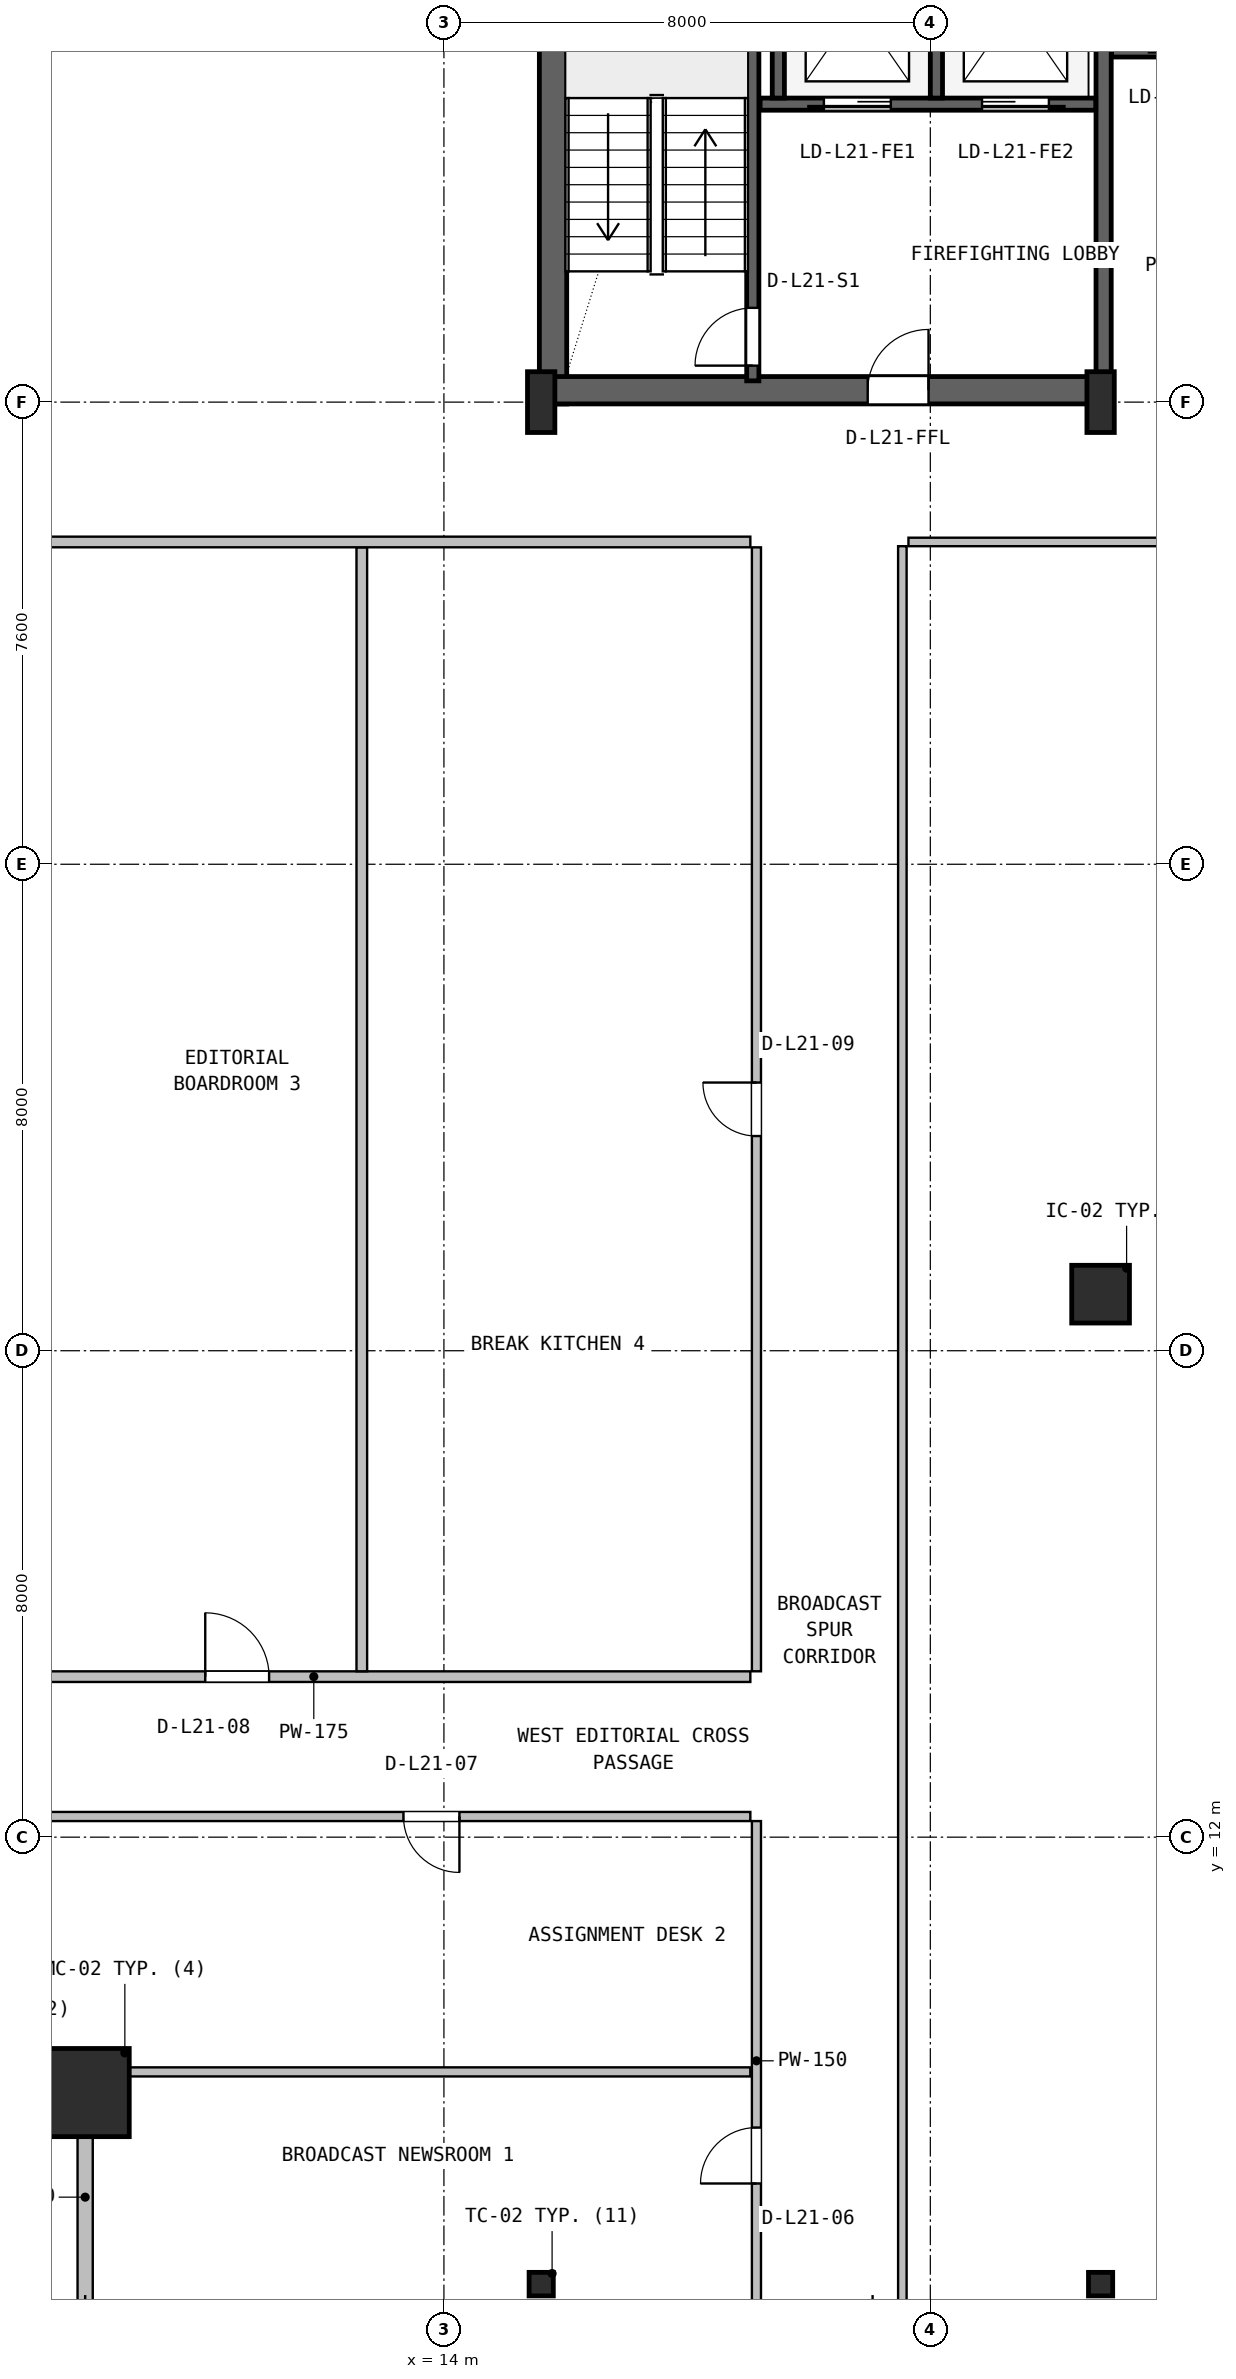
"""IFC4 building model, lengths in metres.
Left out: names, types, materials, properties, quantities, classifications, styles, units other than length and angle.
Written with IfcOpenShell. Run it as: python <this file> out.ifc"""

import sys

from ifc_helpers import new_model, si_unit, direction, frame, frame_2d, origin, origin_2d, place, context, subcontext, project, spatial, rectangle, hollow_rectangle, i_section, extrude, source, transform, mapped, element, fill, save


model = new_model("IFC4")
c1 = context("Model", 3, precision=1e-05, world=origin(), true_north=direction((0.0, 1.0)))
c2 = subcontext(c1, "Body", "Model", "MODEL_VIEW")
j1 = project(units=[si_unit("LENGTHUNIT", "METRE"), si_unit("PLANEANGLEUNIT", "RADIAN")], contexts=[c1])
p1 = place(None, origin())
s1 = spatial("IfcSite", under=j1, at=p1, CompositionType="ELEMENT")
p2 = place(p1, origin())
s2 = spatial("IfcBuilding", under=s1, at=p2, CompositionType="ELEMENT")
p3 = place(p2, frame((0.0, 0.0, 90.8)))
s3 = spatial("IfcBuildingStorey", under=s2, at=p3, CompositionType="ELEMENT", Elevation=90.8)
p4 = place(p3, frame((15.795, 35.57, 0.0), z_axis=(0.0, 0.0, 1.0), x_axis=(0.0, 1.0, 0.0)))
e1 = element("IfcWall", 1, at=p4, inside=s3, PredefinedType="SHEAR", context=c2, shape_type="SweptSolid", body=[
    extrude(rectangle(XDim=11.23, YDim=0.45, at=frame_2d((5.615, 0.0))), origin(), (0.0, 0.0, 1.0), 3.55),
])
p5 = place(p3, frame((15.57, 35.795, 0.0), z_axis=(0.0, 0.0, 1.0), x_axis=(1.0, 0.0, 0.0)))
e2 = element("IfcWall", 2, at=p5, inside=s3, PredefinedType="SHEAR", context=c2, shape_type="SweptSolid", body=[
    extrude(rectangle(XDim=9.23, YDim=0.45, at=frame_2d((4.615, 0.0))), origin(), (0.0, 0.0, 1.0), 3.55),
])
p6 = place(p5, frame((5.4, 0.0, 0.0)))
e3 = element("IfcOpeningElement", 3, at=p6, cuts=e2, PredefinedType="OPENING", context=c2, shape_type="SweptSolid", body=[
    extrude(rectangle(XDim=1.0, YDim=2.1, at=frame_2d((0.5, 1.05))), frame((0.0, 0.235, 0.0), z_axis=(0.0, -1.0, 0.0), x_axis=(1.0, 0.0, 0.0)), (0.0, 0.0, 1.0), 0.47),
])
m1 = source(origin(), c2, "Body", "SweptSolid", [
    extrude(i_section(OverallWidth=0.45, OverallDepth=1.0, WebThickness=0.016, FlangeThickness=0.03, FilletRadius=0.016, at=origin_2d()), origin(), (0.0, 0.0, 1.0), 3.8),
])
for number, where, z_axis, x_axis in (
    (4, (15.6, 35.6, 0.0), (0.0, 0.0, 1.0), (1.0, 0.0, 0.0)),
    (5, (24.8, 35.6, 0.0), (0.0, 0.0, 1.0), (1.0, 0.0, 0.0)),
):
    element("IfcColumn", number, at=place(p3, frame(where, z_axis=z_axis, x_axis=x_axis)), inside=s3, PredefinedType="COLUMN", context=c2, shape_type="MappedRepresentation", body=[
        mapped(m1, transform((0.0, 0.0, 0.0), x_axis=(1.0, 0.0, 0.0), y_axis=(0.0, 1.0, 0.0), z_axis=(0.0, 0.0, 1.0), scale=1.0)),
    ])
m2 = source(origin(), c2, "Body", "SweptSolid", [
    extrude(hollow_rectangle(XDim=1.45, YDim=1.45, WallThickness=0.055, at=origin_2d()), origin(), (0.0, 0.0, 1.0), 3.8),
])
p7 = place(p3, frame((8.1, 7.8, 0.0), z_axis=(0.0, 0.0, 1.0), x_axis=(1.0, 0.0, 0.0)))
e6 = element("IfcColumn", 6, at=p7, inside=s3, PredefinedType="COLUMN", context=c2, shape_type="MappedRepresentation", body=[
    mapped(m2, transform((0.0, 0.0, 0.0), x_axis=(1.0, 0.0, 0.0), y_axis=(0.0, 1.0, 0.0), z_axis=(0.0, 0.0, 1.0), scale=1.0)),
])
m3 = source(origin(), c2, "Body", "SweptSolid", [
    extrude(i_section(OverallWidth=0.398, OverallDepth=0.387, WebThickness=0.021, FlangeThickness=0.033, FilletRadius=0.018, at=origin_2d()), origin(), (0.0, 0.0, 1.0), 3.8),
])
for number, where, z_axis, x_axis in (
    (7, (15.6, 4.65, 0.0), (0.0, 0.0, 1.0), (1.0, 0.0, 0.0)),
    (8, (24.8, 4.65, 0.0), (0.0, 0.0, 1.0), (1.0, 0.0, 0.0)),
):
    element("IfcColumn", number, at=place(p3, frame(where, z_axis=z_axis, x_axis=x_axis)), inside=s3, PredefinedType="COLUMN", context=c2, shape_type="MappedRepresentation", body=[
        mapped(m3, transform((0.0, 0.0, 0.0), x_axis=(1.0, 0.0, 0.0), y_axis=(0.0, 1.0, 0.0), z_axis=(0.0, 0.0, 1.0), scale=1.0)),
    ])
m4 = source(origin(), c2, "Body", "SweptSolid", [
    extrude(rectangle(XDim=0.95, YDim=0.95, at=origin_2d()), origin(), (0.0, 0.0, 1.0), 3.8),
])
p8 = place(p3, frame((24.8, 20.93, 0.0), z_axis=(0.0, 0.0, 1.0), x_axis=(1.0, 0.0, 0.0)))
e9 = element("IfcColumn", 9, at=p8, inside=s3, PredefinedType="COLUMN", context=c2, shape_type="MappedRepresentation", body=[
    mapped(m4, transform((0.0, 0.0, 0.0), x_axis=(1.0, 0.0, 0.0), y_axis=(0.0, 1.0, 0.0), z_axis=(0.0, 0.0, 1.0), scale=1.0)),
])
p9 = place(p3, frame((8.1, 4.28, 0.0), z_axis=(0.0, 0.0, 1.0), x_axis=(0.0, 1.0, 0.0)))
e10 = element("IfcWall", 10, at=p9, inside=s3, PredefinedType="SOLIDWALL", context=c2, shape_type="SweptSolid", body=[
    extrude(rectangle(XDim=3.6, YDim=0.25, at=frame_2d((1.8, 0.0))), origin(), (0.0, 0.0, 1.0), 3.108),
])
p10 = place(p3, frame((19.08, 35.95, 0.0), z_axis=(0.0, 0.0, 1.0), x_axis=(0.0, 1.0, 0.0)))
e11 = element("IfcWall", 11, at=p10, inside=s3, PredefinedType="SHEAR", context=c2, shape_type="SweptSolid", body=[
    extrude(rectangle(XDim=9.65, YDim=0.2, at=frame_2d((4.825, 0.0))), origin(), (0.0, 0.0, 1.0), 3.55),
])
p11 = place(p10, frame((0.25, 0.0, 0.0)))
e12 = element("IfcOpeningElement", 12, at=p11, cuts=e11, PredefinedType="OPENING", context=c2, shape_type="SweptSolid", body=[
    extrude(rectangle(XDim=0.95, YDim=2.1, at=frame_2d((0.475, 1.05))), frame((0.0, 0.11, 0.0), z_axis=(0.0, -1.0, 0.0), x_axis=(1.0, 0.0, 0.0)), (0.0, 0.0, 1.0), 0.22),
])
p12 = place(p3, frame((24.85, 36.05, 0.0), z_axis=(0.0, 0.0, 1.0), x_axis=(0.0, 1.0, 0.0)))
e13 = element("IfcWall", 13, at=p12, inside=s3, PredefinedType="SHEAR", context=c2, shape_type="SweptSolid", body=[
    extrude(rectangle(XDim=10.45, YDim=0.25, at=frame_2d((5.225, 0.0))), origin(), (0.0, 0.0, 1.0), 3.55),
])
p13 = place(p3, frame((19.2, 40.5, 0.0), z_axis=(0.0, 0.0, 1.0), x_axis=(1.0, 0.0, 0.0)))
e14 = element("IfcWall", 14, at=p13, inside=s3, PredefinedType="SHEAR", context=c2, shape_type="SweptSolid", body=[
    extrude(rectangle(XDim=5.52, YDim=0.2, at=frame_2d((2.76, 0.0))), origin(), (0.0, 0.0, 1.0), 3.55),
])
p14 = place(p13, frame((1.05, 0.0, 0.0)))
e15 = element("IfcOpeningElement", 15, at=p14, cuts=e14, PredefinedType="OPENING", context=c2, shape_type="SweptSolid", body=[
    extrude(rectangle(XDim=1.1, YDim=2.18, at=frame_2d((0.55, 1.09))), frame((0.0, 0.11, 0.0), z_axis=(0.0, -1.0, 0.0), x_axis=(1.0, 0.0, 0.0)), (0.0, 0.0, 1.0), 0.22),
])
p15 = place(p13, frame((3.65, 0.0, 0.0)))
e16 = element("IfcOpeningElement", 16, at=p15, cuts=e14, PredefinedType="OPENING", context=c2, shape_type="SweptSolid", body=[
    extrude(rectangle(XDim=1.1, YDim=2.18, at=frame_2d((0.55, 1.09))), frame((0.0, 0.11, 0.0), z_axis=(0.0, -1.0, 0.0), x_axis=(1.0, 0.0, 0.0)), (0.0, 0.0, 1.0), 0.22),
])
p16 = place(p3, frame((22.1, 40.6, 0.0), z_axis=(0.0, 0.0, 1.0), x_axis=(0.0, 1.0, 0.0)))
e17 = element("IfcWall", 17, at=p16, inside=s3, PredefinedType="SHEAR", context=c2, shape_type="SweptSolid", body=[
    extrude(rectangle(XDim=3.0, YDim=0.2, at=frame_2d((1.5, 0.0))), origin(), (0.0, 0.0, 1.0), 3.55),
])
p17 = place(p3, frame((19.5, 40.6, 0.0), z_axis=(0.0, 0.0, 1.0), x_axis=(0.0, 1.0, 0.0)))
e18 = element("IfcWall", 18, at=p17, inside=s3, PredefinedType="SHEAR", context=c2, shape_type="SweptSolid", body=[
    extrude(rectangle(XDim=5.95, YDim=0.2, at=frame_2d((2.975, 0.0))), origin(), (0.0, 0.0, 1.0), 3.55),
])
p18 = place(p3, frame((24.98, 41.4, 0.0), z_axis=(0.0, 0.0, 1.0), x_axis=(1.0, 0.0, 0.0)))
e19 = element("IfcWall", 19, at=p18, inside=s3, PredefinedType="SHEAR", context=c2, shape_type="SweptSolid", body=[
    extrude(rectangle(XDim=23.82, YDim=0.25, at=frame_2d((11.91, 0.0))), origin(), (0.0, 0.0, 1.0), 3.55),
])
p19 = place(p18, frame((0.87, 0.0, 0.0)))
e20 = element("IfcOpeningElement", 20, at=p19, cuts=e19, PredefinedType="OPENING", context=c2, shape_type="SweptSolid", body=[
    extrude(rectangle(XDim=1.1, YDim=2.18, at=frame_2d((0.55, 1.09))), frame((0.0, 0.135, 0.0), z_axis=(0.0, -1.0, 0.0), x_axis=(1.0, 0.0, 0.0)), (0.0, 0.0, 1.0), 0.27),
])
p20 = place(p18, frame((3.47, 0.0, 0.0)))
e21 = element("IfcOpeningElement", 21, at=p20, cuts=e19, PredefinedType="OPENING", context=c2, shape_type="SweptSolid", body=[
    extrude(rectangle(XDim=1.1, YDim=2.18, at=frame_2d((0.55, 1.09))), frame((0.0, 0.135, 0.0), z_axis=(0.0, -1.0, 0.0), x_axis=(1.0, 0.0, 0.0)), (0.0, 0.0, 1.0), 0.27),
])
p21 = place(p18, frame((6.07, 0.0, 0.0)))
e22 = element("IfcOpeningElement", 22, at=p21, cuts=e19, PredefinedType="OPENING", context=c2, shape_type="SweptSolid", body=[
    extrude(rectangle(XDim=1.1, YDim=2.18, at=frame_2d((0.55, 1.09))), frame((0.0, 0.135, 0.0), z_axis=(0.0, -1.0, 0.0), x_axis=(1.0, 0.0, 0.0)), (0.0, 0.0, 1.0), 0.27),
])
p22 = place(p3, frame((19.14, 4.38, 0.0), z_axis=(0.0, 0.0, 1.0), x_axis=(0.0, 1.0, 0.0)))
e23 = element("IfcWall", 23, at=p22, inside=s3, PredefinedType="PARTITIONING", context=c2, shape_type="SweptSolid", body=[
    extrude(rectangle(XDim=7.885, YDim=0.15, at=frame_2d((3.942, 0.0))), origin(), (0.0, 0.0, 1.0), 3.108),
])
p23 = place(p22, frame((1.925, 0.0, 0.0)))
e24 = element("IfcOpeningElement", 24, at=p23, cuts=e23, PredefinedType="OPENING", context=c2, shape_type="SweptSolid", body=[
    extrude(rectangle(XDim=0.92, YDim=2.08, at=frame_2d((0.46, 1.04))), frame((0.0, 0.085, 0.0), z_axis=(0.0, -1.0, 0.0), x_axis=(1.0, 0.0, 0.0)), (0.0, 0.0, 1.0), 0.17),
])
p24 = place(p3, frame((4.68, 8.14, 0.0), z_axis=(0.0, 0.0, 1.0), x_axis=(1.0, 0.0, 0.0)))
e25 = element("IfcWall", 25, at=p24, inside=s3, PredefinedType="PARTITIONING", context=c2, shape_type="SweptSolid", body=[
    extrude(rectangle(XDim=14.36, YDim=0.15, at=frame_2d((7.18, 0.0))), origin(), (0.0, 0.0, 1.0), 3.108),
])
p25 = place(p3, frame((4.68, 12.34, 0.0), z_axis=(0.0, 0.0, 1.0), x_axis=(1.0, 0.0, 0.0)))
e26 = element("IfcWall", 26, at=p25, inside=s3, PredefinedType="PARTITIONING", context=c2, shape_type="SweptSolid", body=[
    extrude(rectangle(XDim=14.36, YDim=0.15, at=frame_2d((7.18, 0.0))), origin(), (0.0, 0.0, 1.0), 3.108),
])
p26 = place(p25, frame((8.655, 0.0, 0.0)))
e27 = element("IfcOpeningElement", 27, at=p26, cuts=e26, PredefinedType="OPENING", context=c2, shape_type="SweptSolid", body=[
    extrude(rectangle(XDim=0.92, YDim=2.08, at=frame_2d((0.46, 1.04))), frame((0.0, 0.085, 0.0), z_axis=(0.0, -1.0, 0.0), x_axis=(1.0, 0.0, 0.0)), (0.0, 0.0, 1.0), 0.17),
])
p27 = place(p3, frame((4.68, 14.64, 0.0), z_axis=(0.0, 0.0, 1.0), x_axis=(1.0, 0.0, 0.0)))
e28 = element("IfcWall", 28, at=p27, inside=s3, PredefinedType="PARTITIONING", context=c2, shape_type="SweptSolid", body=[
    extrude(rectangle(XDim=14.36, YDim=0.175, at=frame_2d((7.18, 0.0))), origin(), (0.0, 0.0, 1.0), 3.108),
])
p28 = place(p27, frame((5.395, 0.0, 0.0)))
e29 = element("IfcOpeningElement", 29, at=p28, cuts=e28, PredefinedType="OPENING", context=c2, shape_type="SweptSolid", body=[
    extrude(rectangle(XDim=1.05, YDim=2.1, at=frame_2d((0.525, 1.05))), frame((0.0, 0.098, 0.0), z_axis=(0.0, -1.0, 0.0), x_axis=(1.0, 0.0, 0.0)), (0.0, 0.0, 1.0), 0.195),
])
p29 = place(p3, frame((12.65, 14.728, 0.0), z_axis=(0.0, 0.0, 1.0), x_axis=(0.0, 1.0, 0.0)))
e30 = element("IfcWall", 30, at=p29, inside=s3, PredefinedType="PARTITIONING", context=c2, shape_type="SweptSolid", body=[
    extrude(rectangle(XDim=18.484, YDim=0.175, at=frame_2d((9.242, 0.0))), origin(), (0.0, 0.0, 1.0), 3.222),
])
p30 = place(p3, frame((4.68, 33.3, 0.0), z_axis=(0.0, 0.0, 1.0), x_axis=(1.0, 0.0, 0.0)))
e31 = element("IfcWall", 31, at=p30, inside=s3, PredefinedType="PARTITIONING", context=c2, shape_type="SweptSolid", body=[
    extrude(rectangle(XDim=14.36, YDim=0.175, at=frame_2d((7.18, 0.0))), origin(), (0.0, 0.0, 1.0), 3.108),
])
p31 = place(p3, frame((19.14, 14.728, 0.0), z_axis=(0.0, 0.0, 1.0), x_axis=(0.0, 1.0, 0.0)))
e32 = element("IfcWall", 32, at=p31, inside=s3, PredefinedType="PARTITIONING", context=c2, shape_type="SweptSolid", body=[
    extrude(rectangle(XDim=18.484, YDim=0.15, at=frame_2d((9.242, 0.0))), origin(), (0.0, 0.0, 1.0), 3.222),
])
p32 = place(p31, frame((8.802, 0.0, 0.0)))
e33 = element("IfcOpeningElement", 33, at=p32, cuts=e32, PredefinedType="OPENING", context=c2, shape_type="SweptSolid", body=[
    extrude(rectangle(XDim=0.88, YDim=2.06, at=frame_2d((0.44, 1.03))), frame((0.0, 0.085, 0.0), z_axis=(0.0, -1.0, 0.0), x_axis=(1.0, 0.0, 0.0)), (0.0, 0.0, 1.0), 0.17),
])
p33 = place(p3, frame((21.64, 33.3, 0.0), z_axis=(0.0, 0.0, 1.0), x_axis=(1.0, 0.0, 0.0)))
e34 = element("IfcWall", 34, at=p33, inside=s3, PredefinedType="PARTITIONING", context=c2, shape_type="SweptSolid", body=[
    extrude(rectangle(XDim=41.68, YDim=0.14, at=frame_2d((20.84, 0.0))), origin(), (0.0, 0.0, 1.0), 2.83),
])
p34 = place(p33, frame((18.405, 0.0, 0.0)))
e35 = element("IfcOpeningElement", 35, at=p34, cuts=e34, PredefinedType="OPENING", context=c2, shape_type="SweptSolid", body=[
    extrude(rectangle(XDim=1.0, YDim=2.1, at=frame_2d((0.5, 1.05))), frame((0.0, 0.08, 0.0), z_axis=(0.0, -1.0, 0.0), x_axis=(1.0, 0.0, 0.0)), (0.0, 0.0, 1.0), 0.16),
])
p35 = place(p3, frame((21.54, 4.38, 0.0), z_axis=(0.0, 0.0, 1.0), x_axis=(0.0, 1.0, 0.0)))
e36 = element("IfcWall", 36, at=p35, inside=s3, PredefinedType="PARTITIONING", context=c2, shape_type="SweptSolid", body=[
    extrude(rectangle(XDim=28.85, YDim=0.14, at=frame_2d((14.425, 0.0))), origin(), (0.0, 0.0, 1.0), 3.108),
])
m5 = source(origin(), c2, "Body", "SweptSolid", [
    extrude(rectangle(XDim=0.95, YDim=2.1, at=frame_2d((0.475, 1.05))), frame((0.0, 0.025, 0.0), z_axis=(0.0, -1.0, 0.0), x_axis=(1.0, 0.0, 0.0)), (0.0, 0.0, 1.0), 0.05),
])
p36 = place(p11, origin())
e37 = element("IfcDoor", 37, at=p36, inside=s3, OperationType="SINGLE_SWING_LEFT", PredefinedType="DOOR", context=c2, shape_type="MappedRepresentation", body=[
    mapped(m5, transform((0.0, 0.0, 0.0), x_axis=(1.0, 0.0, 0.0), y_axis=(0.0, 1.0, 0.0), z_axis=(0.0, 0.0, 1.0), scale=1.0)),
])
fill(e12, e37)
m6 = source(origin(), c2, "Body", "SweptSolid", [
    extrude(rectangle(XDim=1.0, YDim=2.1, at=frame_2d((0.5, 1.05))), frame((0.0, 0.025, 0.0), z_axis=(0.0, -1.0, 0.0), x_axis=(1.0, 0.0, 0.0)), (0.0, 0.0, 1.0), 0.05),
])
p37 = place(p6, origin())
e38 = element("IfcDoor", 38, at=p37, inside=s3, OperationType="SINGLE_SWING_RIGHT", PredefinedType="DOOR", context=c2, shape_type="MappedRepresentation", body=[
    mapped(m6, transform((0.0, 0.0, 0.0), x_axis=(1.0, 0.0, 0.0), y_axis=(0.0, 1.0, 0.0), z_axis=(0.0, 0.0, 1.0), scale=1.0)),
])
fill(e3, e38)
m7 = source(origin(), c2, "Body", "SweptSolid", [
    extrude(rectangle(XDim=1.1, YDim=2.18, at=frame_2d((0.55, 1.09))), frame((0.0, 0.025, 0.0), z_axis=(0.0, -1.0, 0.0), x_axis=(1.0, 0.0, 0.0)), (0.0, 0.0, 1.0), 0.05),
])
p38 = place(p14, frame((1.1, 0.0, 0.0), z_axis=(0.0, 0.0, 1.0), x_axis=(-1.0, 0.0, 0.0)))
e39 = element("IfcDoor", 39, at=p38, inside=s3, OperationType="SLIDING_TO_LEFT", PredefinedType="DOOR", context=c2, shape_type="MappedRepresentation", body=[
    mapped(m7, transform((0.0, 0.0, 0.0), x_axis=(1.0, 0.0, 0.0), y_axis=(0.0, 1.0, 0.0), z_axis=(0.0, 0.0, 1.0), scale=1.0)),
])
fill(e15, e39)
p39 = place(p15, frame((1.1, 0.0, 0.0), z_axis=(0.0, 0.0, 1.0), x_axis=(-1.0, 0.0, 0.0)))
e40 = element("IfcDoor", 40, at=p39, inside=s3, OperationType="SLIDING_TO_RIGHT", PredefinedType="DOOR", context=c2, shape_type="MappedRepresentation", body=[
    mapped(m7, transform((0.0, 0.0, 0.0), x_axis=(1.0, 0.0, 0.0), y_axis=(0.0, 1.0, 0.0), z_axis=(0.0, 0.0, 1.0), scale=1.0)),
])
fill(e16, e40)
m8 = source(origin(), c2, "Body", "SweptSolid", [
    extrude(rectangle(XDim=0.92, YDim=2.08, at=frame_2d((0.46, 1.04))), frame((0.0, 0.025, 0.0), z_axis=(0.0, -1.0, 0.0), x_axis=(1.0, 0.0, 0.0)), (0.0, 0.0, 1.0), 0.05),
])
p40 = place(p23, origin())
e41 = element("IfcDoor", 41, at=p40, inside=s3, OperationType="SINGLE_SWING_LEFT", PredefinedType="DOOR", context=c2, shape_type="MappedRepresentation", body=[
    mapped(m8, transform((0.0, 0.0, 0.0), x_axis=(1.0, 0.0, 0.0), y_axis=(0.0, 1.0, 0.0), z_axis=(0.0, 0.0, 1.0), scale=1.0)),
])
fill(e24, e41)
p41 = place(p26, frame((0.92, 0.0, 0.0), z_axis=(0.0, 0.0, 1.0), x_axis=(-1.0, 0.0, 0.0)))
e42 = element("IfcDoor", 42, at=p41, inside=s3, OperationType="SINGLE_SWING_RIGHT", PredefinedType="DOOR", context=c2, shape_type="MappedRepresentation", body=[
    mapped(m8, transform((0.0, 0.0, 0.0), x_axis=(1.0, 0.0, 0.0), y_axis=(0.0, 1.0, 0.0), z_axis=(0.0, 0.0, 1.0), scale=1.0)),
])
fill(e27, e42)
m9 = source(origin(), c2, "Body", "SweptSolid", [
    extrude(rectangle(XDim=1.05, YDim=2.1, at=frame_2d((0.525, 1.05))), frame((0.0, 0.025, 0.0), z_axis=(0.0, -1.0, 0.0), x_axis=(1.0, 0.0, 0.0)), (0.0, 0.0, 1.0), 0.05),
])
p42 = place(p28, origin())
e43 = element("IfcDoor", 43, at=p42, inside=s3, OperationType="SINGLE_SWING_LEFT", PredefinedType="DOOR", context=c2, shape_type="MappedRepresentation", body=[
    mapped(m9, transform((0.0, 0.0, 0.0), x_axis=(1.0, 0.0, 0.0), y_axis=(0.0, 1.0, 0.0), z_axis=(0.0, 0.0, 1.0), scale=1.0)),
])
fill(e29, e43)
m10 = source(origin(), c2, "Body", "SweptSolid", [
    extrude(rectangle(XDim=0.88, YDim=2.06, at=frame_2d((0.44, 1.03))), frame((0.0, 0.025, 0.0), z_axis=(0.0, -1.0, 0.0), x_axis=(1.0, 0.0, 0.0)), (0.0, 0.0, 1.0), 0.05),
])
p43 = place(p32, origin())
e44 = element("IfcDoor", 44, at=p43, inside=s3, OperationType="SINGLE_SWING_RIGHT", PredefinedType="DOOR", context=c2, shape_type="MappedRepresentation", body=[
    mapped(m10, transform((0.0, 0.0, 0.0), x_axis=(1.0, 0.0, 0.0), y_axis=(0.0, 1.0, 0.0), z_axis=(0.0, 0.0, 1.0), scale=1.0)),
])
fill(e33, e44)
save(model, sys.argv[1])
